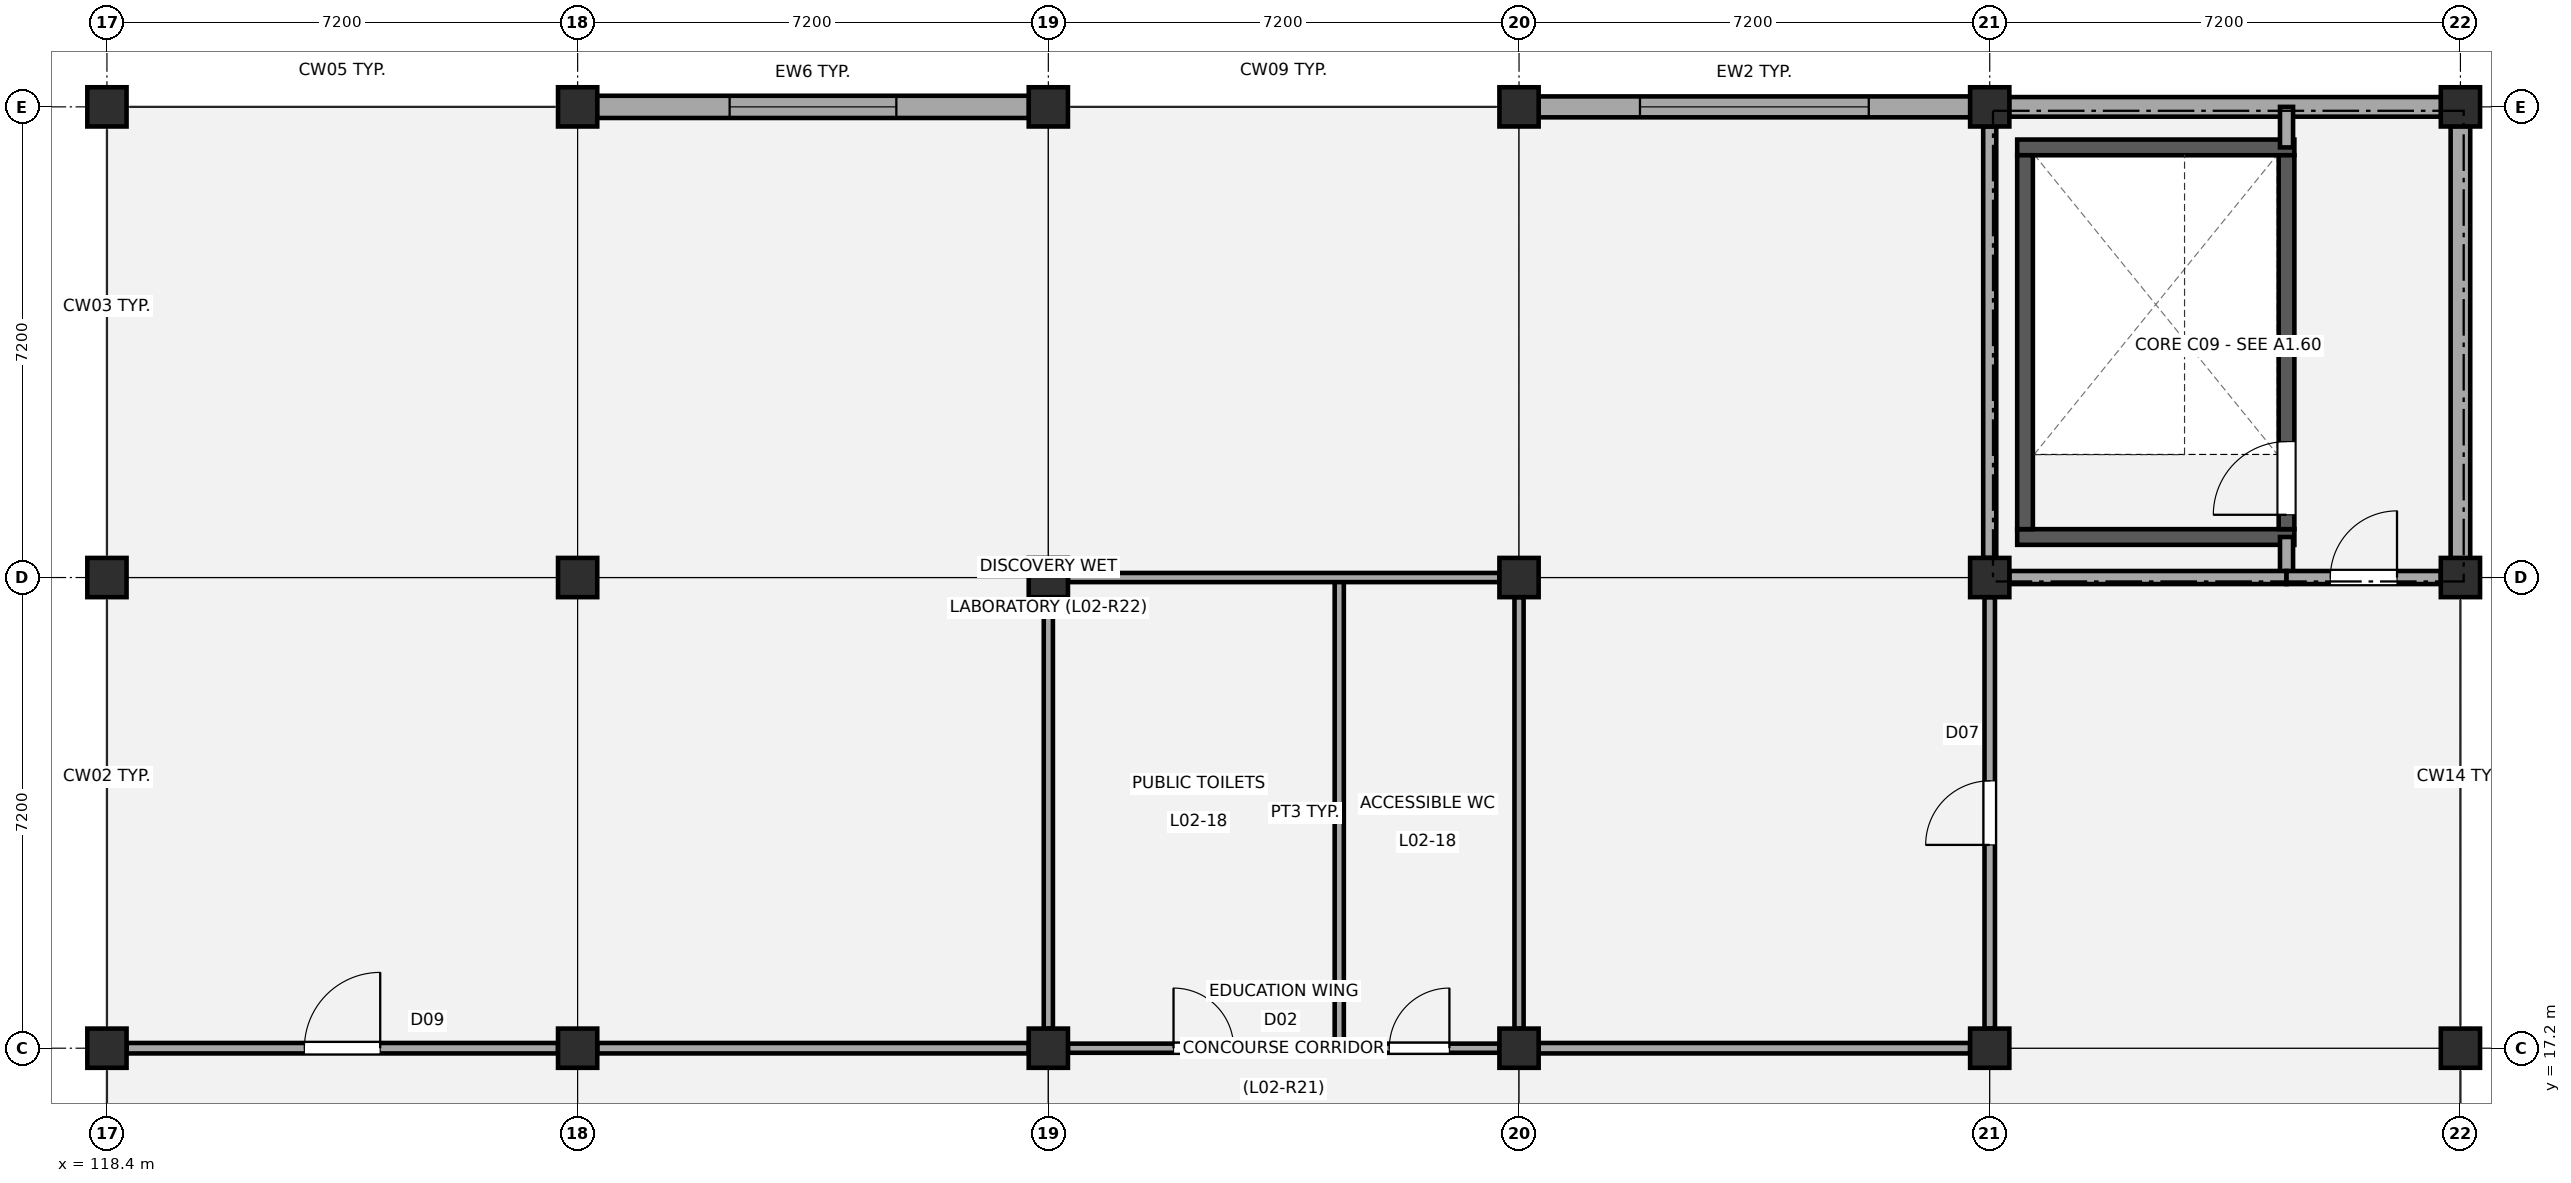
"""IFC4 building model, lengths in metres.
Left out: names, types, materials, properties, quantities, classifications, styles, units other than length and angle.
Written with IfcOpenShell. Run it as: python <this file> out.ifc"""

import sys

from ifc_helpers import new_model, si_unit, direction, frame, frame_2d, origin, origin_2d, place, context, subcontext, project, spatial, rectangle, extrude, element, fill, save


model = new_model("IFC4")
c1 = context("Model", 3, precision=1e-05, world=origin(), true_north=direction((0.0, 1.0)))
c2 = subcontext(c1, "Body", "Model", "MODEL_VIEW")
j1 = project(units=[si_unit("LENGTHUNIT", "METRE"), si_unit("PLANEANGLEUNIT", "RADIAN")], contexts=[c1])
p1 = place(None, origin())
s1 = spatial("IfcSite", under=j1, at=p1, CompositionType="ELEMENT")
p2 = place(p1, origin())
s2 = spatial("IfcBuilding", under=s1, at=p2, CompositionType="ELEMENT")
p3 = place(p2, frame((0.0, 0.0, 9.18)))
s3 = spatial("IfcBuildingStorey", under=s2, at=p3, CompositionType="ELEMENT", Elevation=9.18)
for number, where, z_axis, x_axis in (
    (1, (118.4, 17.2, 0.0), (0.0, 0.0, 1.0), (1.0, 0.0, 0.0)),
    (2, (118.4, 24.4, 0.0), (0.0, 0.0, 1.0), (1.0, 0.0, 0.0)),
    (3, (118.4, 31.6, 0.0), (0.0, 0.0, 1.0), (1.0, 0.0, 0.0)),
    (4, (125.6, 17.2, 0.0), (0.0, 0.0, 1.0), (1.0, 0.0, 0.0)),
    (5, (125.6, 24.4, 0.0), (0.0, 0.0, 1.0), (1.0, 0.0, 0.0)),
    (6, (125.6, 31.6, 0.0), (0.0, 0.0, 1.0), (1.0, 0.0, 0.0)),
    (7, (132.8, 17.2, 0.0), (0.0, 0.0, 1.0), (1.0, 0.0, 0.0)),
    (8, (132.8, 24.4, 0.0), (0.0, 0.0, 1.0), (1.0, 0.0, 0.0)),
    (9, (132.8, 31.6, 0.0), (0.0, 0.0, 1.0), (1.0, 0.0, 0.0)),
    (10, (140.0, 17.2, 0.0), (0.0, 0.0, 1.0), (1.0, 0.0, 0.0)),
    (11, (140.0, 24.4, 0.0), (0.0, 0.0, 1.0), (1.0, 0.0, 0.0)),
    (12, (140.0, 31.6, 0.0), (0.0, 0.0, 1.0), (1.0, 0.0, 0.0)),
    (13, (147.2, 17.2, 0.0), (0.0, 0.0, 1.0), (1.0, 0.0, 0.0)),
    (14, (147.2, 24.4, 0.0), (0.0, 0.0, 1.0), (1.0, 0.0, 0.0)),
    (15, (147.2, 31.6, 0.0), (0.0, 0.0, 1.0), (1.0, 0.0, 0.0)),
    (16, (154.4, 17.2, 0.0), (0.0, 0.0, 1.0), (1.0, 0.0, 0.0)),
    (17, (154.4, 24.4, 0.0), (0.0, 0.0, 1.0), (1.0, 0.0, 0.0)),
    (18, (154.4, 31.6, 0.0), (0.0, 0.0, 1.0), (1.0, 0.0, 0.0)),
):
    element("IfcColumn", number, at=place(p3, frame(where, z_axis=z_axis, x_axis=x_axis)), inside=s3, PredefinedType="COLUMN", context=c2, shape_type="SweptSolid", body=[
        extrude(rectangle(XDim=0.6, YDim=0.6, at=origin_2d()), origin(), (0.0, 0.0, 1.0), 4.32),
    ])
p4 = place(p3, frame((125.895, 31.6, 0.0), z_axis=(0.0, 0.0, 1.0), x_axis=(1.0, 0.0, 0.0)))
e19 = element("IfcWall", 19, at=p4, inside=s3, PredefinedType="STANDARD", context=c2, shape_type="SweptSolid", body=[
    extrude(rectangle(XDim=6.61, YDim=0.34, at=frame_2d((3.305, 0.0))), origin(), (0.0, 0.0, 1.0), 3.52),
])
p5 = place(p4, frame((2.03, 0.0, 0.95)))
e20 = element("IfcOpeningElement", 20, at=p5, cuts=e19, PredefinedType="OPENING", context=c2, shape_type="SweptSolid", body=[
    extrude(rectangle(XDim=2.55, YDim=1.35, at=frame_2d((1.275, 0.675))), frame((0.0, 0.18, 0.0), z_axis=(0.0, -1.0, 0.0), x_axis=(1.0, 0.0, 0.0)), (0.0, 0.0, 1.0), 0.36),
])
p6 = place(p3, frame((140.295, 31.6, 0.0), z_axis=(0.0, 0.0, 1.0), x_axis=(1.0, 0.0, 0.0)))
e21 = element("IfcWall", 21, at=p6, inside=s3, PredefinedType="STANDARD", context=c2, shape_type="SweptSolid", body=[
    extrude(rectangle(XDim=6.61, YDim=0.32, at=frame_2d((3.305, 0.0))), origin(), (0.0, 0.0, 1.0), 3.52),
])
p7 = place(p6, frame((1.555, 0.0, 0.95)))
e22 = element("IfcOpeningElement", 22, at=p7, cuts=e21, PredefinedType="OPENING", context=c2, shape_type="SweptSolid", body=[
    extrude(rectangle(XDim=3.5, YDim=1.55, at=frame_2d((1.75, 0.775))), frame((0.0, 0.17, 0.0), z_axis=(0.0, -1.0, 0.0), x_axis=(1.0, 0.0, 0.0)), (0.0, 0.0, 1.0), 0.34),
])
for number, where, z_axis, x_axis in (
    (23, (147.495, 31.6, 0.0), (0.0, 0.0, 1.0), (1.0, 0.0, 0.0)),
    (24, (154.4, 31.305, 0.0), (0.0, 0.0, 1.0), (0.0, -1.0, 0.0)),
):
    element("IfcWall", number, at=place(p3, frame(where, z_axis=z_axis, x_axis=x_axis)), inside=s3, PredefinedType="STANDARD", context=c2, shape_type="SweptSolid", body=[
        extrude(rectangle(XDim=6.61, YDim=0.3, at=frame_2d((3.305, 0.0))), origin(), (0.0, 0.0, 1.0), 3.52),
    ])
for number, where, z_axis, x_axis in (
    (25, (147.62, 25.02, 0.0), (0.0, 0.0, 1.0), (1.0, 0.0, 0.0)),
    (26, (147.62, 30.98, 0.0), (0.0, 0.0, 1.0), (1.0, 0.0, 0.0)),
):
    element("IfcWall", number, at=place(p3, frame(where, z_axis=z_axis, x_axis=x_axis)), inside=s3, PredefinedType="SHEAR", context=c2, shape_type="SweptSolid", body=[
        extrude(rectangle(XDim=4.24, YDim=0.24, at=frame_2d((2.12, 0.0))), origin(), (0.0, 0.0, 1.0), 4.08),
    ])
p8 = place(p3, frame((147.74, 25.14, 0.0), z_axis=(0.0, 0.0, 1.0), x_axis=(0.0, 1.0, 0.0)))
e27 = element("IfcWall", 27, at=p8, inside=s3, PredefinedType="SHEAR", context=c2, shape_type="SweptSolid", body=[
    extrude(rectangle(XDim=5.72, YDim=0.24, at=frame_2d((2.86, 0.0))), origin(), (0.0, 0.0, 1.0), 4.08),
])
p9 = place(p3, frame((151.74, 25.14, 0.0), z_axis=(0.0, 0.0, 1.0), x_axis=(0.0, 1.0, 0.0)))
e28 = element("IfcWall", 28, at=p9, inside=s3, PredefinedType="SHEAR", context=c2, shape_type="SweptSolid", body=[
    extrude(rectangle(XDim=5.72, YDim=0.24, at=frame_2d((2.86, 0.0))), origin(), (0.0, 0.0, 1.0), 4.08),
])
p10 = place(p9, frame((0.22, 0.0, 0.0)))
e29 = element("IfcOpeningElement", 29, at=p10, cuts=e28, PredefinedType="OPENING", context=c2, shape_type="SweptSolid", body=[
    extrude(rectangle(XDim=1.12, YDim=2.15, at=frame_2d((0.56, 1.075))), frame((0.0, 0.13, 0.0), z_axis=(0.0, -1.0, 0.0), x_axis=(1.0, 0.0, 0.0)), (0.0, 0.0, 1.0), 0.26),
])
p11 = place(p3, frame((151.74, 24.4, 0.0), z_axis=(0.0, 0.0, 1.0), x_axis=(0.0, 1.0, 0.0)))
e30 = element("IfcWall", 30, at=p11, inside=s3, PredefinedType="PARTITIONING", context=c2, shape_type="SweptSolid", body=[
    extrude(rectangle(XDim=0.62, YDim=0.2, at=frame_2d((0.31, 0.0))), origin(), (0.0, 0.0, 1.0), 3.47),
])
p12 = place(p3, frame((151.74, 30.98, 0.0), z_axis=(0.0, 0.0, 1.0), x_axis=(0.0, 1.0, 0.0)))
e31 = element("IfcWall", 31, at=p12, inside=s3, PredefinedType="PARTITIONING", context=c2, shape_type="SweptSolid", body=[
    extrude(rectangle(XDim=0.62, YDim=0.2, at=frame_2d((0.31, 0.0))), origin(), (0.0, 0.0, 1.0), 3.52),
])
p13 = place(p3, frame((147.2, 24.7, 0.0), z_axis=(0.0, 0.0, 1.0), x_axis=(0.0, 1.0, 0.0)))
e32 = element("IfcWall", 32, at=p13, inside=s3, PredefinedType="PARTITIONING", context=c2, shape_type="SweptSolid", body=[
    extrude(rectangle(XDim=6.6, YDim=0.2, at=frame_2d((3.3, 0.0))), origin(), (0.0, 0.0, 1.0), 3.47),
])
p14 = place(p3, frame((147.5, 24.4, 0.0), z_axis=(0.0, 0.0, 1.0), x_axis=(1.0, 0.0, 0.0)))
e33 = element("IfcWall", 33, at=p14, inside=s3, PredefinedType="PARTITIONING", context=c2, shape_type="SweptSolid", body=[
    extrude(rectangle(XDim=4.24, YDim=0.2, at=frame_2d((2.12, 0.0))), origin(), (0.0, 0.0, 1.0), 3.47),
])
p15 = place(p3, frame((151.74, 24.4, 0.0), z_axis=(0.0, 0.0, 1.0), x_axis=(1.0, 0.0, 0.0)))
e34 = element("IfcWall", 34, at=p15, inside=s3, PredefinedType="PARTITIONING", context=c2, shape_type="SweptSolid", body=[
    extrude(rectangle(XDim=2.36, YDim=0.2, at=frame_2d((1.18, 0.0))), origin(), (0.0, 0.0, 1.0), 3.47),
])
p16 = place(p15, frame((0.67, 0.0, 0.0)))
e35 = element("IfcOpeningElement", 35, at=p16, cuts=e34, PredefinedType="OPENING", context=c2, shape_type="SweptSolid", body=[
    extrude(rectangle(XDim=1.02, YDim=2.15, at=frame_2d((0.51, 1.075))), frame((0.0, 0.11, 0.0), z_axis=(0.0, -1.0, 0.0), x_axis=(1.0, 0.0, 0.0)), (0.0, 0.0, 1.0), 0.22),
])
p17 = place(p3, frame((137.25, 17.2, 0.0), z_axis=(0.0, 0.0, 1.0), x_axis=(0.0, 1.0, 0.0)))
e36 = element("IfcWall", 36, at=p17, inside=s3, PredefinedType="PARTITIONING", context=c2, shape_type="SweptSolid", body=[
    extrude(rectangle(XDim=7.2, YDim=0.14, at=frame_2d((3.6, 0.0))), origin(), (0.0, 0.0, 1.0), 3.5),
])
p18 = place(p3, frame((133.1, 17.2, 0.0), z_axis=(0.0, 0.0, 1.0), x_axis=(1.0, 0.0, 0.0)))
e37 = element("IfcWall", 37, at=p18, inside=s3, PredefinedType="PARTITIONING", context=c2, shape_type="SweptSolid", body=[
    extrude(rectangle(XDim=4.15, YDim=0.14, at=frame_2d((2.075, 0.0))), origin(), (0.0, 0.0, 1.0), 3.42),
])
p19 = place(p18, frame((1.615, 0.0, 0.0)))
e38 = element("IfcOpeningElement", 38, at=p19, cuts=e37, PredefinedType="OPENING", context=c2, shape_type="SweptSolid", body=[
    extrude(rectangle(XDim=0.92, YDim=2.08, at=frame_2d((0.46, 1.04))), frame((0.0, 0.08, 0.0), z_axis=(0.0, -1.0, 0.0), x_axis=(1.0, 0.0, 0.0)), (0.0, 0.0, 1.0), 0.16),
])
p20 = place(p3, frame((137.25, 17.2, 0.0), z_axis=(0.0, 0.0, 1.0), x_axis=(1.0, 0.0, 0.0)))
e39 = element("IfcWall", 39, at=p20, inside=s3, PredefinedType="PARTITIONING", context=c2, shape_type="SweptSolid", body=[
    extrude(rectangle(XDim=2.45, YDim=0.14, at=frame_2d((1.225, 0.0))), origin(), (0.0, 0.0, 1.0), 3.42),
])
p21 = place(p20, frame((0.765, 0.0, 0.0)))
e40 = element("IfcOpeningElement", 40, at=p21, cuts=e39, PredefinedType="OPENING", context=c2, shape_type="SweptSolid", body=[
    extrude(rectangle(XDim=0.92, YDim=2.08, at=frame_2d((0.46, 1.04))), frame((0.0, 0.08, 0.0), z_axis=(0.0, -1.0, 0.0), x_axis=(1.0, 0.0, 0.0)), (0.0, 0.0, 1.0), 0.16),
])
p22 = place(p3, frame((133.1, 24.4, 0.0), z_axis=(0.0, 0.0, 1.0), x_axis=(1.0, 0.0, 0.0)))
e41 = element("IfcWall", 41, at=p22, inside=s3, PredefinedType="PARTITIONING", context=c2, shape_type="SweptSolid", body=[
    extrude(rectangle(XDim=6.6, YDim=0.14, at=frame_2d((3.3, 0.0))), origin(), (0.0, 0.0, 1.0), 3.47),
])
for number, where, z_axis, x_axis in (
    (42, (132.8, 17.5, 0.0), (0.0, 0.0, 1.0), (0.0, 1.0, 0.0)),
    (43, (140.0, 17.5, 0.0), (0.0, 0.0, 1.0), (0.0, 1.0, 0.0)),
):
    element("IfcWall", number, at=place(p3, frame(where, z_axis=z_axis, x_axis=x_axis)), inside=s3, PredefinedType="PARTITIONING", context=c2, shape_type="SweptSolid", body=[
        extrude(rectangle(XDim=6.6, YDim=0.14, at=frame_2d((3.3, 0.0))), origin(), (0.0, 0.0, 1.0), 3.42),
    ])
p23 = place(p3, frame((118.7, 17.2, 0.0), z_axis=(0.0, 0.0, 1.0), x_axis=(1.0, 0.0, 0.0)))
e44 = element("IfcWall", 44, at=p23, inside=s3, PredefinedType="PARTITIONING", context=c2, shape_type="SweptSolid", body=[
    extrude(rectangle(XDim=6.6, YDim=0.16, at=frame_2d((3.3, 0.0))), origin(), (0.0, 0.0, 1.0), 3.42),
])
p24 = place(p23, frame((2.72, 0.0, 0.0)))
e45 = element("IfcOpeningElement", 45, at=p24, cuts=e44, PredefinedType="OPENING", context=c2, shape_type="SweptSolid", body=[
    extrude(rectangle(XDim=1.16, YDim=2.18, at=frame_2d((0.58, 1.09))), frame((0.0, 0.09, 0.0), z_axis=(0.0, -1.0, 0.0), x_axis=(1.0, 0.0, 0.0)), (0.0, 0.0, 1.0), 0.18),
])
p25 = place(p3, frame((125.9, 17.2, 0.0), z_axis=(0.0, 0.0, 1.0), x_axis=(1.0, 0.0, 0.0)))
e46 = element("IfcWall", 46, at=p25, inside=s3, PredefinedType="PARTITIONING", context=c2, shape_type="SweptSolid", body=[
    extrude(rectangle(XDim=6.6, YDim=0.16, at=frame_2d((3.3, 0.0))), origin(), (0.0, 0.0, 1.0), 3.47),
])
p26 = place(p3, frame((140.3, 17.2, 0.0), z_axis=(0.0, 0.0, 1.0), x_axis=(1.0, 0.0, 0.0)))
e47 = element("IfcWall", 47, at=p26, inside=s3, PredefinedType="PARTITIONING", context=c2, shape_type="SweptSolid", body=[
    extrude(rectangle(XDim=6.6, YDim=0.16, at=frame_2d((3.3, 0.0))), origin(), (0.0, 0.0, 1.0), 3.47),
])
p27 = place(p3, frame((147.2, 17.5, 0.0), z_axis=(0.0, 0.0, 1.0), x_axis=(0.0, 1.0, 0.0)))
e48 = element("IfcWall", 48, at=p27, inside=s3, PredefinedType="PARTITIONING", context=c2, shape_type="SweptSolid", body=[
    extrude(rectangle(XDim=6.6, YDim=0.16, at=frame_2d((3.3, 0.0))), origin(), (0.0, 0.0, 1.0), 3.42),
])
p28 = place(p27, frame((2.81, 0.0, 0.0)))
e49 = element("IfcOpeningElement", 49, at=p28, cuts=e48, PredefinedType="OPENING", context=c2, shape_type="SweptSolid", body=[
    extrude(rectangle(XDim=0.98, YDim=2.12, at=frame_2d((0.49, 1.06))), frame((0.0, 0.09, 0.0), z_axis=(0.0, -1.0, 0.0), x_axis=(1.0, 0.0, 0.0)), (0.0, 0.0, 1.0), 0.18),
])
p29 = place(p5, origin())
e50 = element("IfcWindow", 50, at=p29, inside=s3, PartitioningType="SINGLE_PANEL", PredefinedType="WINDOW", context=c2, shape_type="SweptSolid", body=[
    extrude(rectangle(XDim=2.55, YDim=1.35, at=frame_2d((1.275, 0.675))), frame((0.0, 0.03, 0.0), z_axis=(0.0, -1.0, 0.0), x_axis=(1.0, 0.0, 0.0)), (0.0, 0.0, 1.0), 0.06),
])
fill(e20, e50)
p30 = place(p7, origin())
e51 = element("IfcWindow", 51, at=p30, inside=s3, PartitioningType="SINGLE_PANEL", PredefinedType="WINDOW", context=c2, shape_type="SweptSolid", body=[
    extrude(rectangle(XDim=3.5, YDim=1.55, at=frame_2d((1.75, 0.775))), frame((0.0, 0.03, 0.0), z_axis=(0.0, -1.0, 0.0), x_axis=(1.0, 0.0, 0.0)), (0.0, 0.0, 1.0), 0.06),
])
fill(e22, e51)
p31 = place(p10, origin())
e52 = element("IfcDoor", 52, at=p31, inside=s3, OperationType="SINGLE_SWING_LEFT", PredefinedType="DOOR", context=c2, shape_type="SweptSolid", body=[
    extrude(rectangle(XDim=1.12, YDim=2.15, at=frame_2d((0.56, 1.075))), frame((0.0, 0.025, 0.0), z_axis=(0.0, -1.0, 0.0), x_axis=(1.0, 0.0, 0.0)), (0.0, 0.0, 1.0), 0.05),
])
fill(e29, e52)
p32 = place(p16, origin())
e53 = element("IfcDoor", 53, at=p32, inside=s3, OperationType="SINGLE_SWING_RIGHT", PredefinedType="DOOR", context=c2, shape_type="SweptSolid", body=[
    extrude(rectangle(XDim=1.02, YDim=2.15, at=frame_2d((0.51, 1.075))), frame((0.0, 0.025, 0.0), z_axis=(0.0, -1.0, 0.0), x_axis=(1.0, 0.0, 0.0)), (0.0, 0.0, 1.0), 0.05),
])
fill(e35, e53)
p33 = place(p19, origin())
e54 = element("IfcDoor", 54, at=p33, inside=s3, OperationType="SINGLE_SWING_LEFT", PredefinedType="DOOR", context=c2, shape_type="SweptSolid", body=[
    extrude(rectangle(XDim=0.92, YDim=2.08, at=frame_2d((0.46, 1.04))), frame((0.0, 0.025, 0.0), z_axis=(0.0, -1.0, 0.0), x_axis=(1.0, 0.0, 0.0)), (0.0, 0.0, 1.0), 0.05),
])
fill(e38, e54)
p34 = place(p21, origin())
e55 = element("IfcDoor", 55, at=p34, inside=s3, OperationType="SINGLE_SWING_RIGHT", PredefinedType="DOOR", context=c2, shape_type="SweptSolid", body=[
    extrude(rectangle(XDim=0.92, YDim=2.08, at=frame_2d((0.46, 1.04))), frame((0.0, 0.025, 0.0), z_axis=(0.0, -1.0, 0.0), x_axis=(1.0, 0.0, 0.0)), (0.0, 0.0, 1.0), 0.05),
])
fill(e40, e55)
p35 = place(p24, origin())
e56 = element("IfcDoor", 56, at=p35, inside=s3, OperationType="SINGLE_SWING_RIGHT", PredefinedType="DOOR", context=c2, shape_type="SweptSolid", body=[
    extrude(rectangle(XDim=1.16, YDim=2.18, at=frame_2d((0.58, 1.09))), frame((0.0, 0.025, 0.0), z_axis=(0.0, -1.0, 0.0), x_axis=(1.0, 0.0, 0.0)), (0.0, 0.0, 1.0), 0.05),
])
fill(e45, e56)
p36 = place(p28, origin())
e57 = element("IfcDoor", 57, at=p36, inside=s3, OperationType="SINGLE_SWING_LEFT", PredefinedType="DOOR", context=c2, shape_type="SweptSolid", body=[
    extrude(rectangle(XDim=0.98, YDim=2.12, at=frame_2d((0.49, 1.06))), frame((0.0, 0.025, 0.0), z_axis=(0.0, -1.0, 0.0), x_axis=(1.0, 0.0, 0.0)), (0.0, 0.0, 1.0), 0.05),
])
fill(e49, e57)
save(model, sys.argv[1])
